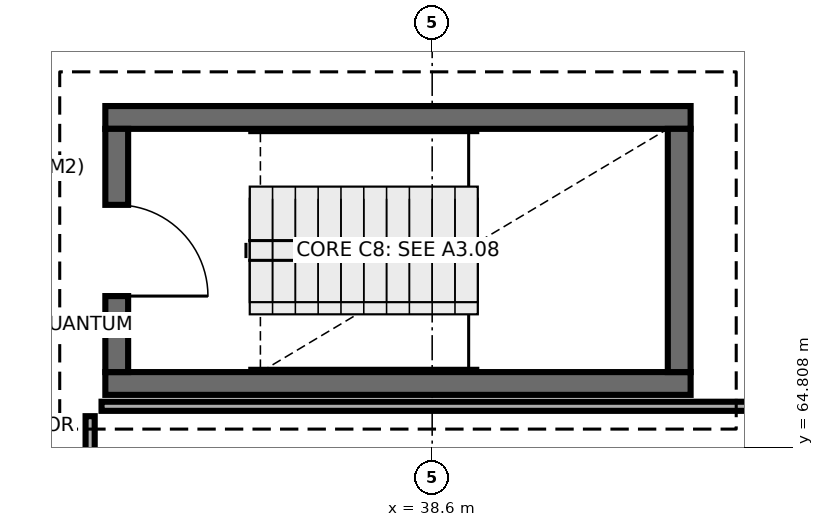
"""IFC4 building model, lengths in metres.
Left out: names, types, materials, properties, quantities, classifications, styles, units other than length and angle.
Written with IfcOpenShell. Run it as: python <this file> out.ifc"""

import sys

from ifc_helpers import new_model, si_unit, direction, frame, frame_2d, origin, place, context, subcontext, project, spatial, rectangle, extrude, element, fill, save


model = new_model("IFC4")
c1 = context("Model", 3, precision=1e-05, world=origin(), true_north=direction((0.0, 1.0)))
c2 = subcontext(c1, "Body", "Model", "MODEL_VIEW")
j1 = project(units=[si_unit("LENGTHUNIT", "METRE"), si_unit("PLANEANGLEUNIT", "RADIAN")], contexts=[c1])
p1 = place(None, origin())
s1 = spatial("IfcSite", under=j1, at=p1, CompositionType="ELEMENT")
p2 = place(p1, origin())
s2 = spatial("IfcBuilding", under=s1, at=p2, CompositionType="ELEMENT")
p3 = place(p2, frame((0.0, 0.0, 22.8)))
s3 = spatial("IfcBuildingStorey", under=s2, at=p3, CompositionType="ELEMENT", Elevation=22.8)
for number, where, z_axis, x_axis in (
    (1, (34.3, 65.65, 0.0), (0.0, 0.0, 1.0), (1.0, 0.0, 0.0)),
    (2, (42.0, 69.15, 0.0), (0.0, 0.0, 1.0), (-1.0, 0.0, 0.0)),
):
    element("IfcWall", number, at=place(p3, frame(where, z_axis=z_axis, x_axis=x_axis)), inside=s3, PredefinedType="SHEAR", context=c2, shape_type="SweptSolid", body=[
        extrude(rectangle(XDim=7.7, YDim=0.3, at=frame_2d((3.85, 0.0))), origin(), (0.0, 0.0, 1.0), 3.9),
    ])
p4 = place(p3, frame((34.45, 69.0, 0.0), z_axis=(0.0, 0.0, 1.0), x_axis=(0.0, -1.0, 0.0)))
e3 = element("IfcWall", 3, at=p4, inside=s3, PredefinedType="SHEAR", context=c2, shape_type="SweptSolid", body=[
    extrude(rectangle(XDim=3.2, YDim=0.3, at=frame_2d((1.6, 0.0))), origin(), (0.0, 0.0, 1.0), 3.9),
])
p5 = place(p4, frame((1.0, 0.0, 0.0)))
e4 = element("IfcOpeningElement", 4, at=p5, cuts=e3, PredefinedType="OPENING", context=c2, shape_type="SweptSolid", body=[
    extrude(rectangle(XDim=1.2, YDim=2.15, at=frame_2d((0.6, 1.075))), frame((0.0, 0.16, 0.0), z_axis=(0.0, -1.0, 0.0), x_axis=(1.0, 0.0, 0.0)), (0.0, 0.0, 1.0), 0.32),
])
p6 = place(p3, frame((41.85, 65.8, 0.0), z_axis=(0.0, 0.0, 1.0), x_axis=(0.0, 1.0, 0.0)))
e5 = element("IfcWall", 5, at=p6, inside=s3, PredefinedType="SHEAR", context=c2, shape_type="SweptSolid", body=[
    extrude(rectangle(XDim=3.2, YDim=0.3, at=frame_2d((1.6, 0.0))), origin(), (0.0, 0.0, 1.0), 3.9),
])
p7 = place(p3, frame((34.1, 61.5, 0.0), z_axis=(0.0, 0.0, 1.0), x_axis=(0.0, 1.0, 0.0)))
e6 = element("IfcWall", 6, at=p7, inside=s3, PredefinedType="PARTITIONING", context=c2, shape_type="SweptSolid", body=[
    extrude(rectangle(XDim=3.72, YDim=0.12, at=frame_2d((1.86, 0.0))), origin(), (0.0, 0.0, 1.0), 3.68),
])
p8 = place(p7, frame((1.41, 0.0, 0.0)))
e7 = element("IfcOpeningElement", 7, at=p8, cuts=e6, PredefinedType="OPENING", context=c2, shape_type="SweptSolid", body=[
    extrude(rectangle(XDim=0.9, YDim=2.1, at=frame_2d((0.45, 1.05))), frame((0.0, 0.07, 0.0), z_axis=(0.0, -1.0, 0.0), x_axis=(1.0, 0.0, 0.0)), (0.0, 0.0, 1.0), 0.14),
])
p9 = place(p3, frame((34.25, 65.35, 0.0), z_axis=(0.0, 0.0, 1.0), x_axis=(1.0, 0.0, 0.0)))
e8 = element("IfcWall", 8, at=p9, inside=s3, PredefinedType="PARTITIONING", context=c2, shape_type="SweptSolid", body=[
    extrude(rectangle(XDim=12.865, YDim=0.12, at=frame_2d((6.433, 0.0))), origin(), (0.0, 0.0, 1.0), 3.68),
])
p10 = place(p5, origin())
e9 = element("IfcDoor", 9, at=p10, inside=s3, OperationType="SINGLE_SWING_RIGHT", PredefinedType="DOOR", context=c2, shape_type="SweptSolid", body=[
    extrude(rectangle(XDim=1.2, YDim=2.15, at=frame_2d((0.6, 1.075))), frame((0.0, 0.025, 0.0), z_axis=(0.0, -1.0, 0.0), x_axis=(1.0, 0.0, 0.0)), (0.0, 0.0, 1.0), 0.05),
])
fill(e4, e9)
save(model, sys.argv[1])
